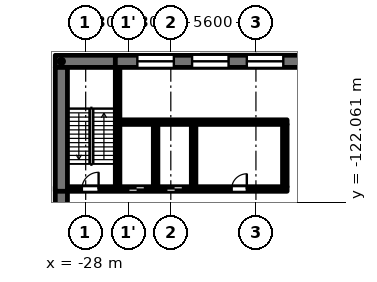
"""IFC4 building model, lengths in metres.
Left out: names, types, materials, properties, quantities, classifications, styles, units other than length and angle.
Written with IfcOpenShell. Run it as: python <this file> out.ifc"""

import sys

from ifc_helpers import new_model, si_unit, direction, frame, frame_2d, origin, place, context, subcontext, project, spatial, rectangle, extrude, element, fill, save


model = new_model("IFC4")
c1 = context("Model", 3, precision=1e-05, world=origin(), true_north=direction((0.0, 1.0)))
c2 = subcontext(c1, "Body", "Model", "MODEL_VIEW")
j1 = project(units=[si_unit("LENGTHUNIT", "METRE"), si_unit("PLANEANGLEUNIT", "RADIAN")], contexts=[c1])
p1 = place(None, origin())
s1 = spatial("IfcSite", under=j1, at=p1, CompositionType="ELEMENT")
p2 = place(p1, origin())
s2 = spatial("IfcBuilding", under=s1, at=p2, CompositionType="ELEMENT")
p3 = place(p2, frame((0.0, 0.0, 11.3)))
s3 = spatial("IfcBuildingStorey", under=s2, at=p3, CompositionType="ELEMENT", Elevation=11.3)
p4 = place(p3, frame((-29.2, -121.2, 0.0), z_axis=(0.0, 0.0, 1.0), x_axis=(1.0, 0.0, 0.0)))
e1 = element("IfcWall", 1, at=p4, inside=s3, PredefinedType="SOLIDWALL", context=c2, shape_type="SweptSolid", body=[
    extrude(rectangle(XDim=14.45, YDim=0.3, at=frame_2d((7.225, 0.0))), origin(), (0.0, 0.0, 1.0), 4.45),
])
p5 = place(p4, frame((4.0, 0.0, 0.0)))
e2 = element("IfcOpeningElement", 2, at=p5, cuts=e1, PredefinedType="OPENING", context=c2, shape_type="SweptSolid", body=[
    extrude(rectangle(XDim=1.1, YDim=2.1, at=frame_2d((0.55, 1.05))), frame((0.0, 0.16, 0.0), z_axis=(0.0, -1.0, 0.0), x_axis=(1.0, 0.0, 0.0)), (0.0, 0.0, 1.0), 0.32),
])
p6 = place(p4, frame((6.5, 0.0, 0.0)))
e3 = element("IfcOpeningElement", 3, at=p6, cuts=e1, PredefinedType="OPENING", context=c2, shape_type="SweptSolid", body=[
    extrude(rectangle(XDim=1.1, YDim=2.1, at=frame_2d((0.55, 1.05))), frame((0.0, 0.16, 0.0), z_axis=(0.0, -1.0, 0.0), x_axis=(1.0, 0.0, 0.0)), (0.0, 0.0, 1.0), 0.32),
])
p7 = place(p4, frame((0.95, 0.0, 0.0)))
e4 = element("IfcOpeningElement", 4, at=p7, cuts=e1, PredefinedType="OPENING", context=c2, shape_type="SweptSolid", body=[
    extrude(rectangle(XDim=1.1, YDim=2.1, at=frame_2d((0.55, 1.05))), frame((0.0, 0.16, 0.0), z_axis=(0.0, -1.0, 0.0), x_axis=(1.0, 0.0, 0.0)), (0.0, 0.0, 1.0), 0.32),
])
p8 = place(p4, frame((10.8, 0.0, 0.0)))
e5 = element("IfcOpeningElement", 5, at=p8, cuts=e1, PredefinedType="OPENING", context=c2, shape_type="SweptSolid", body=[
    extrude(rectangle(XDim=1.0, YDim=2.1, at=frame_2d((0.5, 1.05))), frame((0.0, 0.16, 0.0), z_axis=(0.0, -1.0, 0.0), x_axis=(1.0, 0.0, 0.0)), (0.0, 0.0, 1.0), 0.32),
])
p9 = place(p3, frame((-25.75, -116.8, 0.0), z_axis=(0.0, 0.0, 1.0), x_axis=(1.0, 0.0, 0.0)))
e6 = element("IfcWall", 6, at=p9, inside=s3, PredefinedType="SOLIDWALL", context=c2, shape_type="SweptSolid", body=[
    extrude(rectangle(XDim=11.0, YDim=0.3, at=frame_2d((5.5, 0.0))), origin(), (0.0, 0.0, 1.0), 4.45),
])
p10 = place(p3, frame((-30.0, -112.8, 0.0), z_axis=(0.0, 0.0, 1.0), x_axis=(1.0, 0.0, 0.0)))
e7 = element("IfcWall", 7, at=p10, inside=s3, PredefinedType="SOLIDWALL", context=c2, shape_type="SweptSolid", body=[
    extrude(rectangle(XDim=4.25, YDim=0.8, at=frame_2d((2.125, 0.0))), origin(), (0.0, 0.0, 1.0), 4.45),
])
p11 = place(p3, frame((-26.05, -112.8, 0.0), z_axis=(0.0, 0.0, 1.0), x_axis=(1.0, 0.0, 0.0)))
e8 = element("IfcWall", 8, at=p11, inside=s3, PredefinedType="SOLIDWALL", context=c2, shape_type="SweptSolid", body=[
    extrude(rectangle(XDim=52.1, YDim=0.8, at=frame_2d((26.05, 0.0))), origin(), (0.0, 0.0, 1.0), 4.45),
])
p12 = place(p11, frame((1.45, 0.0, 0.6)))
e9 = element("IfcOpeningElement", 9, at=p12, cuts=e8, PredefinedType="OPENING", context=c2, shape_type="SweptSolid", body=[
    extrude(rectangle(XDim=2.4, YDim=3.2, at=frame_2d((1.2, 1.6))), frame((0.0, 0.41, 0.0), z_axis=(0.0, -1.0, 0.0), x_axis=(1.0, 0.0, 0.0)), (0.0, 0.0, 1.0), 0.82),
])
p13 = place(p11, frame((5.05, 0.0, 0.6)))
e10 = element("IfcOpeningElement", 10, at=p13, cuts=e8, PredefinedType="OPENING", context=c2, shape_type="SweptSolid", body=[
    extrude(rectangle(XDim=2.4, YDim=3.2, at=frame_2d((1.2, 1.6))), frame((0.0, 0.41, 0.0), z_axis=(0.0, -1.0, 0.0), x_axis=(1.0, 0.0, 0.0)), (0.0, 0.0, 1.0), 0.82),
])
p14 = place(p11, frame((8.65, 0.0, 0.6)))
e11 = element("IfcOpeningElement", 11, at=p14, cuts=e8, PredefinedType="OPENING", context=c2, shape_type="SweptSolid", body=[
    extrude(rectangle(XDim=2.4, YDim=3.2, at=frame_2d((1.2, 1.6))), frame((0.0, 0.41, 0.0), z_axis=(0.0, -1.0, 0.0), x_axis=(1.0, 0.0, 0.0)), (0.0, 0.0, 1.0), 0.82),
])
p15 = place(p11, frame((12.25, 0.0, 0.6)))
e12 = element("IfcOpeningElement", 12, at=p15, cuts=e8, PredefinedType="OPENING", context=c2, shape_type="SweptSolid", body=[
    extrude(rectangle(XDim=2.4, YDim=3.2, at=frame_2d((1.2, 1.6))), frame((0.0, 0.41, 0.0), z_axis=(0.0, -1.0, 0.0), x_axis=(1.0, 0.0, 0.0)), (0.0, 0.0, 1.0), 0.82),
])
p16 = place(p11, frame((15.85, 0.0, 0.6)))
e13 = element("IfcOpeningElement", 13, at=p16, cuts=e8, PredefinedType="OPENING", context=c2, shape_type="SweptSolid", body=[
    extrude(rectangle(XDim=2.4, YDim=3.2, at=frame_2d((1.2, 1.6))), frame((0.0, 0.41, 0.0), z_axis=(0.0, -1.0, 0.0), x_axis=(1.0, 0.0, 0.0)), (0.0, 0.0, 1.0), 0.82),
])
p17 = place(p11, frame((19.45, 0.0, 0.6)))
e14 = element("IfcOpeningElement", 14, at=p17, cuts=e8, PredefinedType="OPENING", context=c2, shape_type="SweptSolid", body=[
    extrude(rectangle(XDim=2.4, YDim=3.2, at=frame_2d((1.2, 1.6))), frame((0.0, 0.41, 0.0), z_axis=(0.0, -1.0, 0.0), x_axis=(1.0, 0.0, 0.0)), (0.0, 0.0, 1.0), 0.82),
])
p18 = place(p11, frame((23.05, 0.0, 0.6)))
e15 = element("IfcOpeningElement", 15, at=p18, cuts=e8, PredefinedType="OPENING", context=c2, shape_type="SweptSolid", body=[
    extrude(rectangle(XDim=2.4, YDim=3.2, at=frame_2d((1.2, 1.6))), frame((0.0, 0.41, 0.0), z_axis=(0.0, -1.0, 0.0), x_axis=(1.0, 0.0, 0.0)), (0.0, 0.0, 1.0), 0.82),
])
p19 = place(p11, frame((26.65, 0.0, 0.6)))
e16 = element("IfcOpeningElement", 16, at=p19, cuts=e8, PredefinedType="OPENING", context=c2, shape_type="SweptSolid", body=[
    extrude(rectangle(XDim=2.4, YDim=3.2, at=frame_2d((1.2, 1.6))), frame((0.0, 0.41, 0.0), z_axis=(0.0, -1.0, 0.0), x_axis=(1.0, 0.0, 0.0)), (0.0, 0.0, 1.0), 0.82),
])
p20 = place(p11, frame((30.25, 0.0, 0.6)))
e17 = element("IfcOpeningElement", 17, at=p20, cuts=e8, PredefinedType="OPENING", context=c2, shape_type="SweptSolid", body=[
    extrude(rectangle(XDim=2.4, YDim=3.2, at=frame_2d((1.2, 1.6))), frame((0.0, 0.41, 0.0), z_axis=(0.0, -1.0, 0.0), x_axis=(1.0, 0.0, 0.0)), (0.0, 0.0, 1.0), 0.82),
])
p21 = place(p11, frame((33.85, 0.0, 0.6)))
e18 = element("IfcOpeningElement", 18, at=p21, cuts=e8, PredefinedType="OPENING", context=c2, shape_type="SweptSolid", body=[
    extrude(rectangle(XDim=2.4, YDim=3.2, at=frame_2d((1.2, 1.6))), frame((0.0, 0.41, 0.0), z_axis=(0.0, -1.0, 0.0), x_axis=(1.0, 0.0, 0.0)), (0.0, 0.0, 1.0), 0.82),
])
p22 = place(p11, frame((37.45, 0.0, 0.6)))
e19 = element("IfcOpeningElement", 19, at=p22, cuts=e8, PredefinedType="OPENING", context=c2, shape_type="SweptSolid", body=[
    extrude(rectangle(XDim=2.4, YDim=3.2, at=frame_2d((1.2, 1.6))), frame((0.0, 0.41, 0.0), z_axis=(0.0, -1.0, 0.0), x_axis=(1.0, 0.0, 0.0)), (0.0, 0.0, 1.0), 0.82),
])
p23 = place(p11, frame((41.05, 0.0, 0.6)))
e20 = element("IfcOpeningElement", 20, at=p23, cuts=e8, PredefinedType="OPENING", context=c2, shape_type="SweptSolid", body=[
    extrude(rectangle(XDim=2.4, YDim=3.2, at=frame_2d((1.2, 1.6))), frame((0.0, 0.41, 0.0), z_axis=(0.0, -1.0, 0.0), x_axis=(1.0, 0.0, 0.0)), (0.0, 0.0, 1.0), 0.82),
])
p24 = place(p11, frame((44.65, 0.0, 0.6)))
e21 = element("IfcOpeningElement", 21, at=p24, cuts=e8, PredefinedType="OPENING", context=c2, shape_type="SweptSolid", body=[
    extrude(rectangle(XDim=2.4, YDim=3.2, at=frame_2d((1.2, 1.6))), frame((0.0, 0.41, 0.0), z_axis=(0.0, -1.0, 0.0), x_axis=(1.0, 0.0, 0.0)), (0.0, 0.0, 1.0), 0.82),
])
p25 = place(p11, frame((48.25, 0.0, 0.6)))
e22 = element("IfcOpeningElement", 22, at=p25, cuts=e8, PredefinedType="OPENING", context=c2, shape_type="SweptSolid", body=[
    extrude(rectangle(XDim=2.4, YDim=3.2, at=frame_2d((1.2, 1.6))), frame((0.0, 0.41, 0.0), z_axis=(0.0, -1.0, 0.0), x_axis=(1.0, 0.0, 0.0)), (0.0, 0.0, 1.0), 0.82),
])
p26 = place(p3, frame((-29.6, -124.925, 0.0), z_axis=(0.0, 0.0, 1.0), x_axis=(0.0, 1.0, 0.0)))
e23 = element("IfcWall", 23, at=p26, inside=s3, PredefinedType="SOLIDWALL", context=c2, shape_type="SweptSolid", body=[
    extrude(rectangle(XDim=3.875, YDim=0.8, at=frame_2d((1.938, 0.0))), origin(), (0.0, 0.0, 1.0), 4.45),
])
p27 = place(p3, frame((-29.6, -121.35, 0.0), z_axis=(0.0, 0.0, 1.0), x_axis=(0.0, 1.0, 0.0)))
e24 = element("IfcWall", 24, at=p27, inside=s3, PredefinedType="SOLIDWALL", context=c2, shape_type="SweptSolid", body=[
    extrude(rectangle(XDim=8.15, YDim=0.8, at=frame_2d((4.075, 0.0))), origin(), (0.0, 0.0, 1.0), 4.45),
])
p28 = place(p3, frame((-25.9, -121.05, 0.0), z_axis=(0.0, 0.0, 1.0), x_axis=(0.0, 1.0, 0.0)))
e25 = element("IfcWall", 25, at=p28, inside=s3, PredefinedType="SOLIDWALL", context=c2, shape_type="SweptSolid", body=[
    extrude(rectangle(XDim=7.85, YDim=0.3, at=frame_2d((3.925, 0.0))), origin(), (0.0, 0.0, 1.0), 4.45),
])
for number, where, z_axis, x_axis in (
    (26, (-23.4, -121.05, 0.0), (0.0, 0.0, 1.0), (0.0, 1.0, 0.0)),
    (27, (-20.9, -121.05, 0.0), (0.0, 0.0, 1.0), (0.0, 1.0, 0.0)),
    (28, (-14.9, -121.05, 0.0), (0.0, 0.0, 1.0), (0.0, 1.0, 0.0)),
):
    element("IfcWall", number, at=place(p3, frame(where, z_axis=z_axis, x_axis=x_axis)), inside=s3, PredefinedType="SOLIDWALL", context=c2, shape_type="SweptSolid", body=[
        extrude(rectangle(XDim=4.1, YDim=0.3, at=frame_2d((2.05, 0.0))), origin(), (0.0, 0.0, 1.0), 4.45),
    ])
p29 = place(p12, origin())
e29 = element("IfcWindow", 29, at=p29, inside=s3, PartitioningType="SINGLE_PANEL", PredefinedType="WINDOW", context=c2, shape_type="SweptSolid", body=[
    extrude(rectangle(XDim=2.4, YDim=3.2, at=frame_2d((1.2, 1.6))), frame((0.0, 0.03, 0.0), z_axis=(0.0, -1.0, 0.0), x_axis=(1.0, 0.0, 0.0)), (0.0, 0.0, 1.0), 0.06),
])
fill(e9, e29)
p30 = place(p13, origin())
e30 = element("IfcWindow", 30, at=p30, inside=s3, PartitioningType="SINGLE_PANEL", PredefinedType="WINDOW", context=c2, shape_type="SweptSolid", body=[
    extrude(rectangle(XDim=2.4, YDim=3.2, at=frame_2d((1.2, 1.6))), frame((0.0, 0.03, 0.0), z_axis=(0.0, -1.0, 0.0), x_axis=(1.0, 0.0, 0.0)), (0.0, 0.0, 1.0), 0.06),
])
fill(e10, e30)
p31 = place(p14, origin())
e31 = element("IfcWindow", 31, at=p31, inside=s3, PartitioningType="SINGLE_PANEL", PredefinedType="WINDOW", context=c2, shape_type="SweptSolid", body=[
    extrude(rectangle(XDim=2.4, YDim=3.2, at=frame_2d((1.2, 1.6))), frame((0.0, 0.03, 0.0), z_axis=(0.0, -1.0, 0.0), x_axis=(1.0, 0.0, 0.0)), (0.0, 0.0, 1.0), 0.06),
])
fill(e11, e31)
p32 = place(p5, origin())
e32 = element("IfcDoor", 32, at=p32, inside=s3, OperationType="DOUBLE_DOOR_SLIDING", PredefinedType="DOOR", context=c2, shape_type="SweptSolid", body=[
    extrude(rectangle(XDim=1.1, YDim=2.1, at=frame_2d((0.55, 1.05))), frame((0.0, 0.025, 0.0), z_axis=(0.0, -1.0, 0.0), x_axis=(1.0, 0.0, 0.0)), (0.0, 0.0, 1.0), 0.05),
])
fill(e2, e32)
p33 = place(p6, origin())
e33 = element("IfcDoor", 33, at=p33, inside=s3, OperationType="DOUBLE_DOOR_SLIDING", PredefinedType="DOOR", context=c2, shape_type="SweptSolid", body=[
    extrude(rectangle(XDim=1.1, YDim=2.1, at=frame_2d((0.55, 1.05))), frame((0.0, 0.025, 0.0), z_axis=(0.0, -1.0, 0.0), x_axis=(1.0, 0.0, 0.0)), (0.0, 0.0, 1.0), 0.05),
])
fill(e3, e33)
p34 = place(p7, origin())
e34 = element("IfcDoor", 34, at=p34, inside=s3, OperationType="SINGLE_SWING_RIGHT", PredefinedType="DOOR", context=c2, shape_type="SweptSolid", body=[
    extrude(rectangle(XDim=1.1, YDim=2.1, at=frame_2d((0.55, 1.05))), frame((0.0, 0.025, 0.0), z_axis=(0.0, -1.0, 0.0), x_axis=(1.0, 0.0, 0.0)), (0.0, 0.0, 1.0), 0.05),
])
fill(e4, e34)
p35 = place(p8, origin())
e35 = element("IfcDoor", 35, at=p35, inside=s3, OperationType="SINGLE_SWING_RIGHT", PredefinedType="DOOR", context=c2, shape_type="SweptSolid", body=[
    extrude(rectangle(XDim=1.0, YDim=2.1, at=frame_2d((0.5, 1.05))), frame((0.0, 0.025, 0.0), z_axis=(0.0, -1.0, 0.0), x_axis=(1.0, 0.0, 0.0)), (0.0, 0.0, 1.0), 0.05),
])
fill(e5, e35)
save(model, sys.argv[1])
